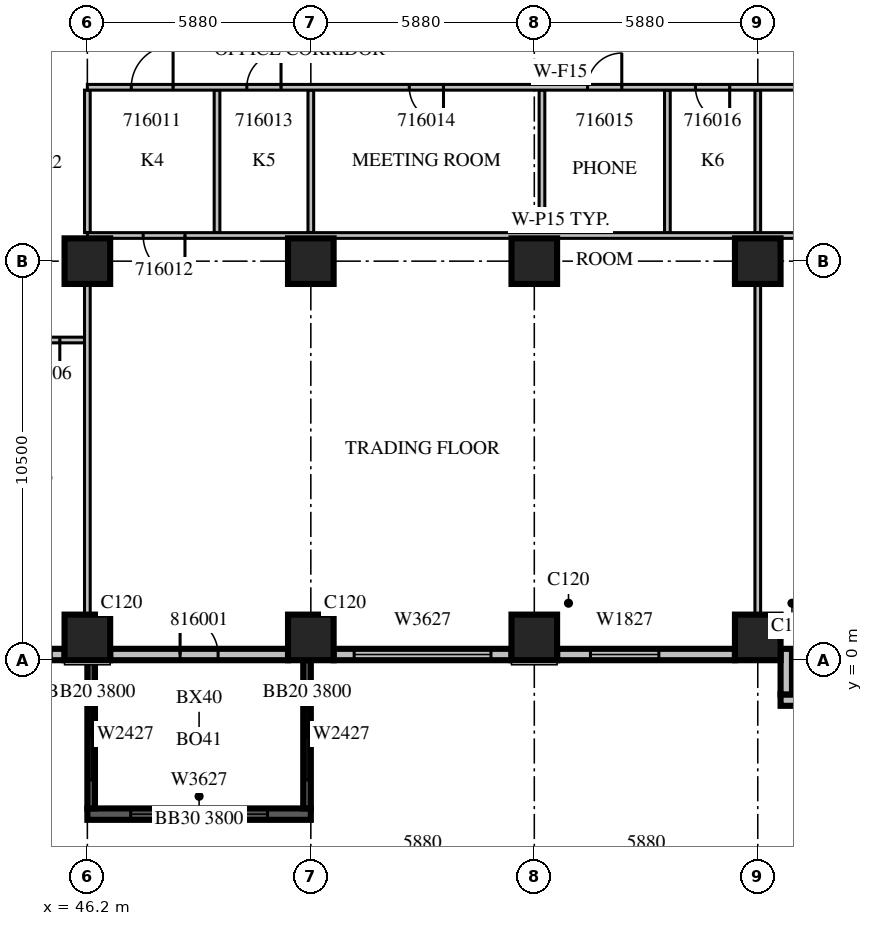
"""IFC4 building model, lengths in metres.
Left out: names, types, materials, properties, quantities, classifications, styles, units other than length and angle.
Written with IfcOpenShell. Run it as: python <this file> out.ifc"""

import sys

from ifc_helpers import new_model, si_unit, direction, frame, frame_2d, origin, origin_2d, place, context, subcontext, project, spatial, rectangle, extrude, source, transform, mapped, element, fill, save


model = new_model("IFC4")
c1 = context("Model", 3, precision=1e-05, world=origin(), true_north=direction((0.0, 1.0)))
c2 = subcontext(c1, "Body", "Model", "MODEL_VIEW")
j1 = project(units=[si_unit("LENGTHUNIT", "METRE"), si_unit("PLANEANGLEUNIT", "RADIAN")], contexts=[c1])
p1 = place(None, origin())
s1 = spatial("IfcSite", under=j1, at=p1, CompositionType="ELEMENT")
p2 = place(p1, origin())
s2 = spatial("IfcBuilding", under=s1, at=p2, CompositionType="ELEMENT")
p3 = place(p2, frame((0.0, 0.0, 78.3)))
s3 = spatial("IfcBuildingStorey", under=s2, at=p3, CompositionType="ELEMENT", Elevation=78.3)
m1 = source(origin(), c2, "Body", "SweptSolid", [
    extrude(rectangle(XDim=1.2, YDim=1.2, at=origin_2d()), origin(), (0.0, 0.0, 1.0), 4.2),
])
for number, where, z_axis, x_axis in (
    (1, (46.2, 0.6, 0.0), (0.0, 0.0, 1.0), (1.0, 0.0, 0.0)),
    (2, (52.08, 0.6, 0.0), (0.0, 0.0, 1.0), (1.0, 0.0, 0.0)),
    (3, (57.96, 0.6, 0.0), (0.0, 0.0, 1.0), (1.0, 0.0, 0.0)),
    (4, (63.84, 0.6, 0.0), (0.0, 0.0, 1.0), (1.0, 0.0, 0.0)),
    (5, (46.2, 10.5, 0.0), (0.0, 0.0, 1.0), (1.0, 0.0, 0.0)),
    (6, (52.08, 10.5, 0.0), (0.0, 0.0, 1.0), (1.0, 0.0, 0.0)),
    (7, (57.96, 10.5, 0.0), (0.0, 0.0, 1.0), (1.0, 0.0, 0.0)),
    (8, (63.84, 10.5, 0.0), (0.0, 0.0, 1.0), (1.0, 0.0, 0.0)),
):
    element("IfcColumn", number, at=place(p3, frame(where, z_axis=z_axis, x_axis=x_axis)), inside=s3, PredefinedType="COLUMN", context=c2, shape_type="MappedRepresentation", body=[
        mapped(m1, transform((0.0, 0.0, 0.0), scale=1.0)),
    ])
m2 = source(origin(), c2, "Body", "SweptSolid", [
    extrude(rectangle(XDim=5.88, YDim=0.3, at=frame_2d((2.94, 0.0))), origin(), (0.0, 0.0, 1.0), 3.8),
])
p4 = place(p3, frame((46.2, -4.05, 0.0), z_axis=(0.0, 0.0, 1.0), x_axis=(1.0, 0.0, 0.0)))
e9 = element("IfcWall", 9, at=p4, inside=s3, PredefinedType="SOLIDWALL", context=c2, shape_type="MappedRepresentation", body=[
    mapped(m2, transform((0.0, 0.0, 0.0), scale=1.0)),
])
m3 = source(origin(), c2, "Body", "SweptSolid", [
    extrude(rectangle(XDim=3.6, YDim=2.7, at=frame_2d((1.8, 1.35))), frame((0.0, 0.16, 0.0), z_axis=(0.0, -1.0, 0.0), x_axis=(1.0, 0.0, 0.0)), (0.0, 0.0, 1.0), 0.32),
])
p5 = place(p4, frame((1.14, 0.0, 0.6)))
e10 = element("IfcOpeningElement", 10, at=p5, cuts=e9, PredefinedType="OPENING", context=c2, shape_type="MappedRepresentation", body=[
    mapped(m3, transform((0.0, 0.0, 0.0), scale=1.0)),
])
m4 = source(origin(), c2, "Body", "SweptSolid", [
    extrude(rectangle(XDim=3.9, YDim=0.2, at=frame_2d((1.95, 0.0))), origin(), (0.0, 0.0, 1.0), 3.8),
])
p6 = place(p3, frame((46.3, 0.0, 0.0), z_axis=(0.0, 0.0, 1.0), x_axis=(0.0, -1.0, 0.0)))
e11 = element("IfcWall", 11, at=p6, inside=s3, PredefinedType="SOLIDWALL", context=c2, shape_type="MappedRepresentation", body=[
    mapped(m4, transform((0.0, 0.0, 0.0), scale=1.0)),
])
m5 = source(origin(), c2, "Body", "SweptSolid", [
    extrude(rectangle(XDim=2.4, YDim=2.7, at=frame_2d((1.2, 1.35))), frame((0.0, 0.11, 0.0), z_axis=(0.0, -1.0, 0.0), x_axis=(1.0, 0.0, 0.0)), (0.0, 0.0, 1.0), 0.22),
])
p7 = place(p6, frame((0.75, 0.0, 0.6)))
e12 = element("IfcOpeningElement", 12, at=p7, cuts=e11, PredefinedType="OPENING", context=c2, shape_type="MappedRepresentation", body=[
    mapped(m5, transform((0.0, 0.0, 0.0), scale=1.0)),
])
p8 = place(p3, frame((51.98, 0.0, 0.0), z_axis=(0.0, 0.0, 1.0), x_axis=(0.0, -1.0, 0.0)))
e13 = element("IfcWall", 13, at=p8, inside=s3, PredefinedType="SOLIDWALL", context=c2, shape_type="MappedRepresentation", body=[
    mapped(m4, transform((0.0, 0.0, 0.0), scale=1.0)),
])
p9 = place(p8, frame((0.75, 0.0, 0.6)))
e14 = element("IfcOpeningElement", 14, at=p9, cuts=e13, PredefinedType="OPENING", context=c2, shape_type="MappedRepresentation", body=[
    mapped(m5, transform((0.0, 0.0, 0.0), scale=1.0)),
])
m6 = source(origin(), c2, "Body", "SweptSolid", [
    extrude(rectangle(XDim=1.6, YDim=0.3, at=frame_2d((0.8, 0.0))), origin(), (0.0, 0.0, 1.0), 3.8),
])
p10 = place(p3, frame((44.0, 0.15, 0.0), z_axis=(0.0, 0.0, 1.0), x_axis=(1.0, 0.0, 0.0)))
e15 = element("IfcWall", 15, at=p10, inside=s3, PredefinedType="STANDARD", context=c2, shape_type="MappedRepresentation", body=[
    mapped(m6, transform((0.0, 0.0, 0.0), scale=1.0)),
])
m7 = source(origin(), c2, "Body", "SweptSolid", [
    extrude(rectangle(XDim=0.9, YDim=2.7, at=frame_2d((0.45, 1.35))), frame((0.0, 0.16, 0.0), z_axis=(0.0, -1.0, 0.0), x_axis=(1.0, 0.0, 0.0)), (0.0, 0.0, 1.0), 0.32),
])
p11 = place(p10, frame((0.35, 0.0, 0.6)))
e16 = element("IfcOpeningElement", 16, at=p11, cuts=e15, PredefinedType="OPENING", context=c2, shape_type="MappedRepresentation", body=[
    mapped(m7, transform((0.0, 0.0, 0.0), scale=1.0)),
])
m8 = source(origin(), c2, "Body", "SweptSolid", [
    extrude(rectangle(XDim=4.68, YDim=0.3, at=frame_2d((2.34, 0.0))), origin(), (0.0, 0.0, 1.0), 3.8),
])
p12 = place(p3, frame((46.8, 0.15, 0.0), z_axis=(0.0, 0.0, 1.0), x_axis=(1.0, 0.0, 0.0)))
e17 = element("IfcWall", 17, at=p12, inside=s3, PredefinedType="STANDARD", context=c2, shape_type="MappedRepresentation", body=[
    mapped(m8, transform((0.0, 0.0, 0.0), scale=1.0)),
])
m9 = source(origin(), c2, "Body", "SweptSolid", [
    extrude(rectangle(XDim=1.0, YDim=2.1, at=frame_2d((0.5, 1.05))), frame((0.0, 0.16, 0.0), z_axis=(0.0, -1.0, 0.0), x_axis=(1.0, 0.0, 0.0)), (0.0, 0.0, 1.0), 0.32),
])
p13 = place(p12, frame((1.84, 0.0, 0.0)))
e18 = element("IfcOpeningElement", 18, at=p13, cuts=e17, PredefinedType="OPENING", context=c2, shape_type="MappedRepresentation", body=[
    mapped(m9, transform((0.0, 0.0, 0.0), scale=1.0)),
])
p14 = place(p3, frame((52.68, 0.15, 0.0), z_axis=(0.0, 0.0, 1.0), x_axis=(1.0, 0.0, 0.0)))
e19 = element("IfcWall", 19, at=p14, inside=s3, PredefinedType="STANDARD", context=c2, shape_type="MappedRepresentation", body=[
    mapped(m8, transform((0.0, 0.0, 0.0), scale=1.0)),
])
p15 = place(p14, frame((0.54, 0.0, 0.6)))
e20 = element("IfcOpeningElement", 20, at=p15, cuts=e19, PredefinedType="OPENING", context=c2, shape_type="MappedRepresentation", body=[
    mapped(m3, transform((0.0, 0.0, 0.0), scale=1.0)),
])
p16 = place(p3, frame((58.56, 0.15, 0.0), z_axis=(0.0, 0.0, 1.0), x_axis=(1.0, 0.0, 0.0)))
e21 = element("IfcWall", 21, at=p16, inside=s3, PredefinedType="STANDARD", context=c2, shape_type="MappedRepresentation", body=[
    mapped(m8, transform((0.0, 0.0, 0.0), scale=1.0)),
])
m10 = source(origin(), c2, "Body", "SweptSolid", [
    extrude(rectangle(XDim=1.8, YDim=2.7, at=frame_2d((0.9, 1.35))), frame((0.0, 0.16, 0.0), z_axis=(0.0, -1.0, 0.0), x_axis=(1.0, 0.0, 0.0)), (0.0, 0.0, 1.0), 0.32),
])
p17 = place(p16, frame((0.877, 0.0, 0.6)))
e22 = element("IfcOpeningElement", 22, at=p17, cuts=e21, PredefinedType="OPENING", context=c2, shape_type="MappedRepresentation", body=[
    mapped(m10, transform((0.0, 0.0, 0.0), scale=1.0)),
])
m11 = source(origin(), c2, "Body", "SweptSolid", [
    extrude(rectangle(XDim=2.76, YDim=0.3, at=frame_2d((1.38, 0.0))), origin(), (0.0, 0.0, 1.0), 3.8),
])
p18 = place(p3, frame((64.44, -1.05, 0.0), z_axis=(0.0, 0.0, 1.0), x_axis=(1.0, 0.0, 0.0)))
e23 = element("IfcWall", 23, at=p18, inside=s3, PredefinedType="STANDARD", context=c2, shape_type="MappedRepresentation", body=[
    mapped(m11, transform((0.0, 0.0, 0.0), scale=1.0)),
])
p19 = place(p18, frame((0.58, 0.0, 0.6)))
e24 = element("IfcOpeningElement", 24, at=p19, cuts=e23, PredefinedType="OPENING", context=c2, shape_type="MappedRepresentation", body=[
    mapped(m10, transform((0.0, 0.0, 0.0), scale=1.0)),
])
m12 = source(origin(), c2, "Body", "SweptSolid", [
    extrude(rectangle(XDim=1.2, YDim=0.3, at=frame_2d((0.6, 0.0))), origin(), (0.0, 0.0, 1.0), 3.8),
])
p20 = place(p3, frame((64.59, 0.3, 0.0), z_axis=(0.0, 0.0, 1.0), x_axis=(0.0, -1.0, 0.0)))
e25 = element("IfcWall", 25, at=p20, inside=s3, PredefinedType="STANDARD", context=c2, shape_type="MappedRepresentation", body=[
    mapped(m12, transform((0.0, 0.0, 0.0), scale=1.0)),
])
m13 = source(origin(), c2, "Body", "SweptSolid", [
    extrude(rectangle(XDim=2.2, YDim=0.15, at=frame_2d((1.1, 0.0))), origin(), (0.0, 0.0, 1.0), 3.8),
])
p21 = place(p3, frame((46.125, 8.425, 0.0), z_axis=(0.0, 0.0, 1.0), x_axis=(-1.0, 0.0, 0.0)))
e26 = element("IfcWall", 26, at=p21, inside=s3, PredefinedType="PARTITIONING", context=c2, shape_type="MappedRepresentation", body=[
    mapped(m13, transform((0.0, 0.0, 0.0), scale=1.0)),
])
m14 = source(origin(), c2, "Body", "SweptSolid", [
    extrude(rectangle(XDim=0.9, YDim=2.1, at=frame_2d((0.45, 1.05))), frame((0.0, 0.085, 0.0), z_axis=(0.0, -1.0, 0.0), x_axis=(1.0, 0.0, 0.0)), (0.0, 0.0, 1.0), 0.17),
])
p22 = place(p21, frame((0.65, 0.0, 0.0)))
e27 = element("IfcOpeningElement", 27, at=p22, cuts=e26, PredefinedType="OPENING", context=c2, shape_type="MappedRepresentation", body=[
    mapped(m14, transform((0.0, 0.0, 0.0), scale=1.0)),
])
m15 = source(origin(), c2, "Body", "SweptSolid", [
    extrude(rectangle(XDim=3.75, YDim=0.15, at=frame_2d((1.875, 0.0))), origin(), (0.0, 0.0, 1.0), 3.8),
])
for number, where, z_axis, x_axis in (
    (28, (49.612, 11.25, 0.0), (0.0, 0.0, 1.0), (0.0, 1.0, 0.0)),
    (29, (52.08, 11.25, 0.0), (0.0, 0.0, 1.0), (0.0, 1.0, 0.0)),
    (30, (58.162, 11.25, 0.0), (0.0, 0.0, 1.0), (0.0, 1.0, 0.0)),
    (31, (61.462, 11.25, 0.0), (0.0, 0.0, 1.0), (0.0, 1.0, 0.0)),
):
    element("IfcWall", number, at=place(p3, frame(where, z_axis=z_axis, x_axis=x_axis)), inside=s3, PredefinedType="PARTITIONING", context=c2, shape_type="MappedRepresentation", body=[
        mapped(m15, transform((0.0, 0.0, 0.0), scale=1.0)),
    ])
m16 = source(origin(), c2, "Body", "SweptSolid", [
    extrude(rectangle(XDim=8.702, YDim=0.15, at=frame_2d((4.351, 0.0))), origin(), (0.0, 0.0, 1.0), 3.8),
])
p23 = place(p3, frame((46.2, 1.199, 0.0), z_axis=(0.0, 0.0, 1.0), x_axis=(0.0, 1.0, 0.0)))
e32 = element("IfcWall", 32, at=p23, inside=s3, PredefinedType="PARTITIONING", context=c2, shape_type="MappedRepresentation", body=[
    mapped(m16, transform((0.0, 0.0, 0.0), scale=1.0)),
])
p24 = place(p3, frame((46.2, 11.25, 0.0), z_axis=(0.0, 0.0, 1.0), x_axis=(0.0, 1.0, 0.0)))
e33 = element("IfcWall", 33, at=p24, inside=s3, PredefinedType="PARTITIONING", context=c2, shape_type="MappedRepresentation", body=[
    mapped(m15, transform((0.0, 0.0, 0.0), scale=1.0)),
])
p25 = place(p3, frame((63.84, 1.199, 0.0), z_axis=(0.0, 0.0, 1.0), x_axis=(0.0, 1.0, 0.0)))
e34 = element("IfcWall", 34, at=p25, inside=s3, PredefinedType="PARTITIONING", context=c2, shape_type="MappedRepresentation", body=[
    mapped(m16, transform((0.0, 0.0, 0.0), scale=1.0)),
])
p26 = place(p3, frame((63.84, 11.25, 0.0), z_axis=(0.0, 0.0, 1.0), x_axis=(0.0, 1.0, 0.0)))
e35 = element("IfcWall", 35, at=p26, inside=s3, PredefinedType="PARTITIONING", context=c2, shape_type="MappedRepresentation", body=[
    mapped(m15, transform((0.0, 0.0, 0.0), scale=1.0)),
])
m17 = source(origin(), c2, "Body", "SweptSolid", [
    extrude(rectangle(XDim=24.9, YDim=0.15, at=frame_2d((12.45, 0.0))), origin(), (0.0, 0.0, 1.0), 3.8),
])
p27 = place(p3, frame((71.1, 11.175, 0.0), z_axis=(0.0, 0.0, 1.0), x_axis=(-1.0, 0.0, 0.0)))
e36 = element("IfcWall", 36, at=p27, inside=s3, PredefinedType="PARTITIONING", context=c2, shape_type="MappedRepresentation", body=[
    mapped(m17, transform((0.0, 0.0, 0.0), scale=1.0)),
])
m18 = source(origin(), c2, "Body", "SweptSolid", [
    extrude(rectangle(XDim=1.1, YDim=2.1, at=frame_2d((0.55, 1.05))), frame((0.0, 0.085, 0.0), z_axis=(0.0, -1.0, 0.0), x_axis=(1.0, 0.0, 0.0)), (0.0, 0.0, 1.0), 0.17),
])
p28 = place(p27, frame((22.332, 0.0, 0.0)))
e37 = element("IfcOpeningElement", 37, at=p28, cuts=e36, PredefinedType="OPENING", context=c2, shape_type="MappedRepresentation", body=[
    mapped(m18, transform((0.0, 0.0, 0.0), scale=1.0)),
])
p29 = place(p27, frame((4.607, 0.0, 0.0)))
e38 = element("IfcOpeningElement", 38, at=p29, cuts=e36, PredefinedType="OPENING", context=c2, shape_type="MappedRepresentation", body=[
    mapped(m14, transform((0.0, 0.0, 0.0), scale=1.0)),
])
p30 = place(p27, frame((2.243, 0.0, 0.0)))
e39 = element("IfcOpeningElement", 39, at=p30, cuts=e36, PredefinedType="OPENING", context=c2, shape_type="MappedRepresentation", body=[
    mapped(m14, transform((0.0, 0.0, 0.0), scale=1.0)),
])
p31 = place(p3, frame((71.1, 15.075, 0.0), z_axis=(0.0, 0.0, 1.0), x_axis=(-1.0, 0.0, 0.0)))
e40 = element("IfcWall", 40, at=p31, inside=s3, PredefinedType="PARTITIONING", context=c2, shape_type="MappedRepresentation", body=[
    mapped(m17, transform((0.0, 0.0, 0.0), scale=1.0)),
])
p32 = place(p31, frame((22.644, 0.0, 0.0)))
e41 = element("IfcOpeningElement", 41, at=p32, cuts=e40, PredefinedType="OPENING", context=c2, shape_type="MappedRepresentation", body=[
    mapped(m18, transform((0.0, 0.0, 0.0), scale=1.0)),
])
p33 = place(p31, frame((19.804, 0.0, 0.0)))
e42 = element("IfcOpeningElement", 42, at=p33, cuts=e40, PredefinedType="OPENING", context=c2, shape_type="MappedRepresentation", body=[
    mapped(m14, transform((0.0, 0.0, 0.0), scale=1.0)),
])
p34 = place(p31, frame((15.529, 0.0, 0.0)))
e43 = element("IfcOpeningElement", 43, at=p34, cuts=e40, PredefinedType="OPENING", context=c2, shape_type="MappedRepresentation", body=[
    mapped(m14, transform((0.0, 0.0, 0.0), scale=1.0)),
])
p35 = place(p31, frame((10.838, 0.0, 0.0)))
e44 = element("IfcOpeningElement", 44, at=p35, cuts=e40, PredefinedType="OPENING", context=c2, shape_type="MappedRepresentation", body=[
    mapped(m14, transform((0.0, 0.0, 0.0), scale=1.0)),
])
p36 = place(p31, frame((7.999, 0.0, 0.0)))
e45 = element("IfcOpeningElement", 45, at=p36, cuts=e40, PredefinedType="OPENING", context=c2, shape_type="MappedRepresentation", body=[
    mapped(m14, transform((0.0, 0.0, 0.0), scale=1.0)),
])
m19 = source(origin(), c2, "Body", "SweptSolid", [
    extrude(rectangle(XDim=1.2, YDim=2.1, at=frame_2d((0.6, 1.05))), frame((0.0, 0.085, 0.0), z_axis=(0.0, -1.0, 0.0), x_axis=(1.0, 0.0, 0.0)), (0.0, 0.0, 1.0), 0.17),
])
p37 = place(p31, frame((2.993, 0.0, 0.0)))
e46 = element("IfcOpeningElement", 46, at=p37, cuts=e40, PredefinedType="OPENING", context=c2, shape_type="MappedRepresentation", body=[
    mapped(m19, transform((0.0, 0.0, 0.0), scale=1.0)),
])
m20 = source(origin(), c2, "Body", "SweptSolid", [
    extrude(rectangle(XDim=3.6, YDim=2.7, at=frame_2d((1.8, 1.35))), frame((0.0, 0.03, 0.0), z_axis=(0.0, -1.0, 0.0), x_axis=(1.0, 0.0, 0.0)), (0.0, 0.0, 1.0), 0.06),
])
p38 = place(p5, origin())
e47 = element("IfcWindow", 47, at=p38, inside=s3, PartitioningType="SINGLE_PANEL", PredefinedType="WINDOW", context=c2, shape_type="MappedRepresentation", body=[
    mapped(m20, transform((0.0, 0.0, 0.0), scale=1.0)),
])
fill(e10, e47)
m21 = source(origin(), c2, "Body", "SweptSolid", [
    extrude(rectangle(XDim=2.4, YDim=2.7, at=frame_2d((1.2, 1.35))), frame((0.0, 0.03, 0.0), z_axis=(0.0, -1.0, 0.0), x_axis=(1.0, 0.0, 0.0)), (0.0, 0.0, 1.0), 0.06),
])
p39 = place(p7, origin())
e48 = element("IfcWindow", 48, at=p39, inside=s3, PartitioningType="SINGLE_PANEL", PredefinedType="WINDOW", context=c2, shape_type="MappedRepresentation", body=[
    mapped(m21, transform((0.0, 0.0, 0.0), scale=1.0)),
])
fill(e12, e48)
p40 = place(p9, origin())
e49 = element("IfcWindow", 49, at=p40, inside=s3, PartitioningType="SINGLE_PANEL", PredefinedType="WINDOW", context=c2, shape_type="MappedRepresentation", body=[
    mapped(m21, transform((0.0, 0.0, 0.0), scale=1.0)),
])
fill(e14, e49)
p41 = place(p15, origin())
e50 = element("IfcWindow", 50, at=p41, inside=s3, PartitioningType="SINGLE_PANEL", PredefinedType="WINDOW", context=c2, shape_type="MappedRepresentation", body=[
    mapped(m20, transform((0.0, 0.0, 0.0), scale=1.0)),
])
fill(e20, e50)
m22 = source(origin(), c2, "Body", "SweptSolid", [
    extrude(rectangle(XDim=1.8, YDim=2.7, at=frame_2d((0.9, 1.35))), frame((0.0, 0.03, 0.0), z_axis=(0.0, -1.0, 0.0), x_axis=(1.0, 0.0, 0.0)), (0.0, 0.0, 1.0), 0.06),
])
p42 = place(p17, origin())
e51 = element("IfcWindow", 51, at=p42, inside=s3, PartitioningType="SINGLE_PANEL", PredefinedType="WINDOW", context=c2, shape_type="MappedRepresentation", body=[
    mapped(m22, transform((0.0, 0.0, 0.0), scale=1.0)),
])
fill(e22, e51)
m23 = source(origin(), c2, "Body", "SweptSolid", [
    extrude(rectangle(XDim=0.9, YDim=2.1, at=frame_2d((0.45, 1.05))), frame((0.0, 0.025, 0.0), z_axis=(0.0, -1.0, 0.0), x_axis=(1.0, 0.0, 0.0)), (0.0, 0.0, 1.0), 0.05),
])
p43 = place(p22, origin())
e52 = element("IfcDoor", 52, at=p43, inside=s3, OperationType="SINGLE_SWING_LEFT", PredefinedType="DOOR", context=c2, shape_type="MappedRepresentation", body=[
    mapped(m23, transform((0.0, 0.0, 0.0), scale=1.0)),
])
fill(e27, e52)
m24 = source(origin(), c2, "Body", "SweptSolid", [
    extrude(rectangle(XDim=1.1, YDim=2.1, at=frame_2d((0.55, 1.05))), frame((0.0, 0.025, 0.0), z_axis=(0.0, -1.0, 0.0), x_axis=(1.0, 0.0, 0.0)), (0.0, 0.0, 1.0), 0.05),
])
p44 = place(p32, origin())
e53 = element("IfcDoor", 53, at=p44, inside=s3, OperationType="SINGLE_SWING_RIGHT", PredefinedType="DOOR", context=c2, shape_type="MappedRepresentation", body=[
    mapped(m24, transform((0.0, 0.0, 0.0), scale=1.0)),
])
fill(e41, e53)
p45 = place(p28, origin())
e54 = element("IfcDoor", 54, at=p45, inside=s3, OperationType="SINGLE_SWING_LEFT", PredefinedType="DOOR", context=c2, shape_type="MappedRepresentation", body=[
    mapped(m24, transform((0.0, 0.0, 0.0), scale=1.0)),
])
fill(e37, e54)
p46 = place(p33, origin())
e55 = element("IfcDoor", 55, at=p46, inside=s3, OperationType="SINGLE_SWING_RIGHT", PredefinedType="DOOR", context=c2, shape_type="MappedRepresentation", body=[
    mapped(m23, transform((0.0, 0.0, 0.0), scale=1.0)),
])
fill(e42, e55)
p47 = place(p34, origin())
e56 = element("IfcDoor", 56, at=p47, inside=s3, OperationType="SINGLE_SWING_LEFT", PredefinedType="DOOR", context=c2, shape_type="MappedRepresentation", body=[
    mapped(m23, transform((0.0, 0.0, 0.0), scale=1.0)),
])
fill(e43, e56)
p48 = place(p35, origin())
e57 = element("IfcDoor", 57, at=p48, inside=s3, OperationType="SINGLE_SWING_RIGHT", PredefinedType="DOOR", context=c2, shape_type="MappedRepresentation", body=[
    mapped(m23, transform((0.0, 0.0, 0.0), scale=1.0)),
])
fill(e44, e57)
p49 = place(p36, origin())
e58 = element("IfcDoor", 58, at=p49, inside=s3, OperationType="SINGLE_SWING_LEFT", PredefinedType="DOOR", context=c2, shape_type="MappedRepresentation", body=[
    mapped(m23, transform((0.0, 0.0, 0.0), scale=1.0)),
])
fill(e45, e58)
m25 = source(origin(), c2, "Body", "SweptSolid", [
    extrude(rectangle(XDim=1.0, YDim=2.1, at=frame_2d((0.5, 1.05))), frame((0.0, 0.025, 0.0), z_axis=(0.0, -1.0, 0.0), x_axis=(1.0, 0.0, 0.0)), (0.0, 0.0, 1.0), 0.05),
])
p50 = place(p13, origin())
e59 = element("IfcDoor", 59, at=p50, inside=s3, OperationType="SINGLE_SWING_LEFT", PredefinedType="DOOR", context=c2, shape_type="MappedRepresentation", body=[
    mapped(m25, transform((0.0, 0.0, 0.0), scale=1.0)),
])
fill(e18, e59)
save(model, sys.argv[1])
